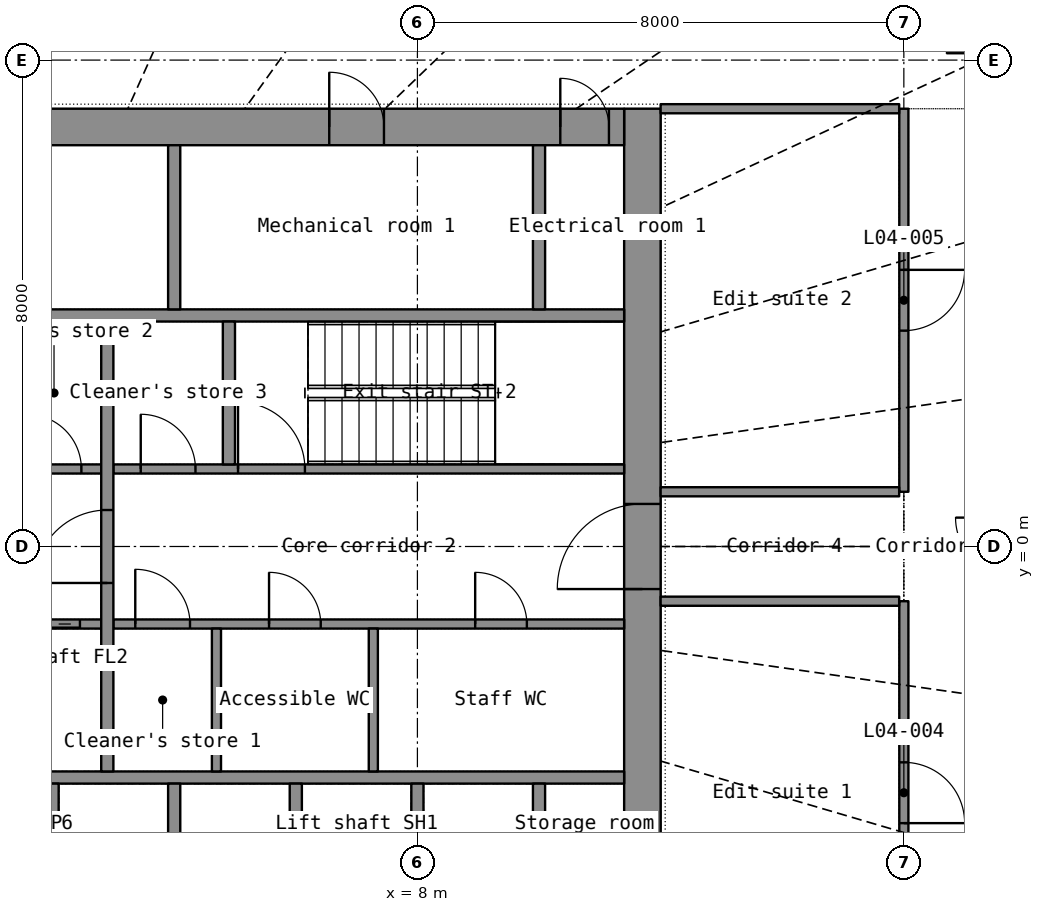
"""IFC4 building model, lengths in metres.
Left out: names, types, materials, properties, quantities, classifications, styles, units other than length and angle.
Written with IfcOpenShell. Run it as: python <this file> out.ifc"""

import sys

from ifc_helpers import new_model, si_unit, direction, frame, frame_2d, origin, place, context, subcontext, project, spatial, rectangle, extrude, element, fill, save


model = new_model("IFC4")
c1 = context("Model", 3, precision=1e-05, world=origin(), true_north=direction((0.0, 1.0)))
c2 = subcontext(c1, "Body", "Model", "MODEL_VIEW")
j1 = project(units=[si_unit("LENGTHUNIT", "METRE"), si_unit("PLANEANGLEUNIT", "RADIAN")], contexts=[c1])
p1 = place(None, origin())
s1 = spatial("IfcSite", under=j1, at=p1, CompositionType="ELEMENT")
p2 = place(p1, origin())
s2 = spatial("IfcBuilding", under=s1, at=p2, CompositionType="ELEMENT")
p3 = place(p2, frame((0.0, 0.0, 24.5)))
s3 = spatial("IfcBuildingStorey", under=s2, at=p3, CompositionType="ELEMENT", Elevation=24.5)
p4 = place(p3, frame((11.7, -7.2, 0.0), z_axis=(0.0, 0.0, 1.0), x_axis=(0.0, 1.0, 0.0)))
e1 = element("IfcWall", 1, at=p4, inside=s3, PredefinedType="SHEAR", context=c2, shape_type="SweptSolid", body=[
    extrude(rectangle(XDim=14.4, YDim=0.6, at=frame_2d((7.2, 0.0))), origin(), (0.0, 0.0, 1.0), 3.8),
])
p5 = place(p4, frame((6.5, 0.0, 0.0)))
e2 = element("IfcOpeningElement", 2, at=p5, cuts=e1, PredefinedType="OPENING", context=c2, shape_type="SweptSolid", body=[
    extrude(rectangle(XDim=1.4, YDim=2.2, at=frame_2d((0.7, 1.1))), frame((0.0, 0.31, 0.0), z_axis=(0.0, -1.0, 0.0), x_axis=(1.0, 0.0, 0.0)), (0.0, 0.0, 1.0), 0.62),
])
p6 = place(p3, frame((-11.4, 6.9, 0.0), z_axis=(0.0, 0.0, 1.0), x_axis=(1.0, 0.0, 0.0)))
e3 = element("IfcWall", 3, at=p6, inside=s3, PredefinedType="SHEAR", context=c2, shape_type="SweptSolid", body=[
    extrude(rectangle(XDim=22.8, YDim=0.6, at=frame_2d((11.4, 0.0))), origin(), (0.0, 0.0, 1.0), 3.8),
])
p7 = place(p6, frame((1.85, 0.0, 0.0)))
e4 = element("IfcOpeningElement", 4, at=p7, cuts=e3, PredefinedType="OPENING", context=c2, shape_type="SweptSolid", body=[
    extrude(rectangle(XDim=1.1, YDim=2.2, at=frame_2d((0.55, 1.1))), frame((0.0, 0.31, 0.0), z_axis=(0.0, -1.0, 0.0), x_axis=(1.0, 0.0, 0.0)), (0.0, 0.0, 1.0), 0.62),
])
p8 = place(p6, frame((9.95, 0.0, 0.0)))
e5 = element("IfcOpeningElement", 5, at=p8, cuts=e3, PredefinedType="OPENING", context=c2, shape_type="SweptSolid", body=[
    extrude(rectangle(XDim=0.9, YDim=2.1, at=frame_2d((0.45, 1.05))), frame((0.0, 0.31, 0.0), z_axis=(0.0, -1.0, 0.0), x_axis=(1.0, 0.0, 0.0)), (0.0, 0.0, 1.0), 0.62),
])
p9 = place(p6, frame((17.95, 0.0, 0.0)))
e6 = element("IfcOpeningElement", 6, at=p9, cuts=e3, PredefinedType="OPENING", context=c2, shape_type="SweptSolid", body=[
    extrude(rectangle(XDim=0.9, YDim=2.1, at=frame_2d((0.45, 1.05))), frame((0.0, 0.31, 0.0), z_axis=(0.0, -1.0, 0.0), x_axis=(1.0, 0.0, 0.0)), (0.0, 0.0, 1.0), 0.62),
])
p10 = place(p6, frame((0.25, 0.0, 0.0)))
e7 = element("IfcOpeningElement", 7, at=p10, cuts=e3, PredefinedType="OPENING", context=c2, shape_type="SweptSolid", body=[
    extrude(rectangle(XDim=0.8, YDim=2.05, at=frame_2d((0.4, 1.025))), frame((0.0, 0.31, 0.0), z_axis=(0.0, -1.0, 0.0), x_axis=(1.0, 0.0, 0.0)), (0.0, 0.0, 1.0), 0.62),
])
p11 = place(p6, frame((21.75, 0.0, 0.0)))
e8 = element("IfcOpeningElement", 8, at=p11, cuts=e3, PredefinedType="OPENING", context=c2, shape_type="SweptSolid", body=[
    extrude(rectangle(XDim=0.8, YDim=2.05, at=frame_2d((0.4, 1.025))), frame((0.0, 0.31, 0.0), z_axis=(0.0, -1.0, 0.0), x_axis=(1.0, 0.0, 0.0)), (0.0, 0.0, 1.0), 0.62),
])
for number, where, z_axis, x_axis in (
    (9, (-11.4, -3.8, 0.0), (0.0, 0.0, 1.0), (1.0, 0.0, 0.0)),
    (10, (-11.4, 3.8, 0.0), (0.0, 0.0, 1.0), (1.0, 0.0, 0.0)),
):
    element("IfcWall", number, at=place(p3, frame(where, z_axis=z_axis, x_axis=x_axis)), inside=s3, PredefinedType="SHEAR", context=c2, shape_type="SweptSolid", body=[
        extrude(rectangle(XDim=22.8, YDim=0.2, at=frame_2d((11.4, 0.0))), origin(), (0.0, 0.0, 1.0), 3.8),
    ])
for number, where, z_axis, x_axis in (
    (11, (2.0, -6.6, 0.0), (0.0, 0.0, 1.0), (0.0, 1.0, 0.0)),
    (12, (4.0, -6.6, 0.0), (0.0, 0.0, 1.0), (0.0, 1.0, 0.0)),
    (13, (6.0, -6.6, 0.0), (0.0, 0.0, 1.0), (0.0, 1.0, 0.0)),
    (14, (8.0, -6.6, 0.0), (0.0, 0.0, 1.0), (0.0, 1.0, 0.0)),
    (15, (10.0, -6.6, 0.0), (0.0, 0.0, 1.0), (0.0, 1.0, 0.0)),
    (16, (10.0, 3.9, 0.0), (0.0, 0.0, 1.0), (0.0, 1.0, 0.0)),
):
    element("IfcWall", number, at=place(p3, frame(where, z_axis=z_axis, x_axis=x_axis)), inside=s3, PredefinedType="SHEAR", context=c2, shape_type="SweptSolid", body=[
        extrude(rectangle(XDim=2.7, YDim=0.2, at=frame_2d((1.35, 0.0))), origin(), (0.0, 0.0, 1.0), 3.8),
    ])
p12 = place(p3, frame((4.0, 3.9, 0.0), z_axis=(0.0, 0.0, 1.0), x_axis=(0.0, 1.0, 0.0)))
e17 = element("IfcWall", 17, at=p12, inside=s3, PredefinedType="PARTITIONING", context=c2, shape_type="SweptSolid", body=[
    extrude(rectangle(XDim=2.7, YDim=0.2, at=frame_2d((1.35, 0.0))), origin(), (0.0, 0.0, 1.0), 3.8),
])
p13 = place(p3, frame((-2.8, -1.275, 0.0), z_axis=(0.0, 0.0, 1.0), x_axis=(1.0, 0.0, 0.0)))
e18 = element("IfcWall", 18, at=p13, inside=s3, PredefinedType="SHEAR", context=c2, shape_type="SweptSolid", body=[
    extrude(rectangle(XDim=5.6, YDim=0.15, at=frame_2d((2.8, 0.0))), origin(), (0.0, 0.0, 1.0), 3.8),
])
p14 = place(p13, frame((4.15, 0.0, 0.0)))
e19 = element("IfcOpeningElement", 19, at=p14, cuts=e18, PredefinedType="OPENING", context=c2, shape_type="SweptSolid", body=[
    extrude(rectangle(XDim=1.1, YDim=2.2, at=frame_2d((0.55, 1.1))), frame((0.0, 0.085, 0.0), z_axis=(0.0, -1.0, 0.0), x_axis=(1.0, 0.0, 0.0)), (0.0, 0.0, 1.0), 0.17),
])
p15 = place(p13, frame((0.326, 0.0, 0.0)))
e20 = element("IfcOpeningElement", 20, at=p15, cuts=e18, PredefinedType="OPENING", context=c2, shape_type="SweptSolid", body=[
    extrude(rectangle(XDim=0.9, YDim=2.1, at=frame_2d((0.45, 1.05))), frame((0.0, 0.085, 0.0), z_axis=(0.0, -1.0, 0.0), x_axis=(1.0, 0.0, 0.0)), (0.0, 0.0, 1.0), 0.17),
])
p16 = place(p13, frame((2.201, 0.0, 0.0)))
e21 = element("IfcOpeningElement", 21, at=p16, cuts=e18, PredefinedType="OPENING", context=c2, shape_type="SweptSolid", body=[
    extrude(rectangle(XDim=0.9, YDim=2.1, at=frame_2d((0.45, 1.05))), frame((0.0, 0.085, 0.0), z_axis=(0.0, -1.0, 0.0), x_axis=(1.0, 0.0, 0.0)), (0.0, 0.0, 1.0), 0.17),
])
p17 = place(p3, frame((3.0, -1.275, 0.0), z_axis=(0.0, 0.0, 1.0), x_axis=(1.0, 0.0, 0.0)))
e22 = element("IfcWall", 22, at=p17, inside=s3, PredefinedType="PARTITIONING", context=c2, shape_type="SweptSolid", body=[
    extrude(rectangle(XDim=8.4, YDim=0.15, at=frame_2d((4.2, 0.0))), origin(), (0.0, 0.0, 1.0), 3.8),
])
p18 = place(p17, frame((0.36, 0.0, 0.0)))
e23 = element("IfcOpeningElement", 23, at=p18, cuts=e22, PredefinedType="OPENING", context=c2, shape_type="SweptSolid", body=[
    extrude(rectangle(XDim=0.9, YDim=2.1, at=frame_2d((0.45, 1.05))), frame((0.0, 0.085, 0.0), z_axis=(0.0, -1.0, 0.0), x_axis=(1.0, 0.0, 0.0)), (0.0, 0.0, 1.0), 0.17),
])
p19 = place(p17, frame((2.56, 0.0, 0.0)))
e24 = element("IfcOpeningElement", 24, at=p19, cuts=e22, PredefinedType="OPENING", context=c2, shape_type="SweptSolid", body=[
    extrude(rectangle(XDim=0.85, YDim=2.1, at=frame_2d((0.425, 1.05))), frame((0.0, 0.085, 0.0), z_axis=(0.0, -1.0, 0.0), x_axis=(1.0, 0.0, 0.0)), (0.0, 0.0, 1.0), 0.17),
])
p20 = place(p17, frame((5.95, 0.0, 0.0)))
e25 = element("IfcOpeningElement", 25, at=p20, cuts=e22, PredefinedType="OPENING", context=c2, shape_type="SweptSolid", body=[
    extrude(rectangle(XDim=0.85, YDim=2.1, at=frame_2d((0.425, 1.05))), frame((0.0, 0.085, 0.0), z_axis=(0.0, -1.0, 0.0), x_axis=(1.0, 0.0, 0.0)), (0.0, 0.0, 1.0), 0.17),
])
p21 = place(p3, frame((-2.8, 1.275, 0.0), z_axis=(0.0, 0.0, 1.0), x_axis=(1.0, 0.0, 0.0)))
e26 = element("IfcWall", 26, at=p21, inside=s3, PredefinedType="SHEAR", context=c2, shape_type="SweptSolid", body=[
    extrude(rectangle(XDim=5.6, YDim=0.15, at=frame_2d((2.8, 0.0))), origin(), (0.0, 0.0, 1.0), 3.8),
])
p22 = place(p21, frame((0.35, 0.0, 0.0)))
e27 = element("IfcOpeningElement", 27, at=p22, cuts=e26, PredefinedType="OPENING", context=c2, shape_type="SweptSolid", body=[
    extrude(rectangle(XDim=1.1, YDim=2.2, at=frame_2d((0.55, 1.1))), frame((0.0, 0.085, 0.0), z_axis=(0.0, -1.0, 0.0), x_axis=(1.0, 0.0, 0.0)), (0.0, 0.0, 1.0), 0.17),
])
p23 = place(p21, frame((2.499, 0.0, 0.0)))
e28 = element("IfcOpeningElement", 28, at=p23, cuts=e26, PredefinedType="OPENING", context=c2, shape_type="SweptSolid", body=[
    extrude(rectangle(XDim=0.9, YDim=2.1, at=frame_2d((0.45, 1.05))), frame((0.0, 0.085, 0.0), z_axis=(0.0, -1.0, 0.0), x_axis=(1.0, 0.0, 0.0)), (0.0, 0.0, 1.0), 0.17),
])
p24 = place(p21, frame((4.374, 0.0, 0.0)))
e29 = element("IfcOpeningElement", 29, at=p24, cuts=e26, PredefinedType="OPENING", context=c2, shape_type="SweptSolid", body=[
    extrude(rectangle(XDim=0.9, YDim=2.1, at=frame_2d((0.45, 1.05))), frame((0.0, 0.085, 0.0), z_axis=(0.0, -1.0, 0.0), x_axis=(1.0, 0.0, 0.0)), (0.0, 0.0, 1.0), 0.17),
])
p25 = place(p3, frame((3.0, 1.275, 0.0), z_axis=(0.0, 0.0, 1.0), x_axis=(1.0, 0.0, 0.0)))
e30 = element("IfcWall", 30, at=p25, inside=s3, PredefinedType="SHEAR", context=c2, shape_type="SweptSolid", body=[
    extrude(rectangle(XDim=8.4, YDim=0.15, at=frame_2d((4.2, 0.0))), origin(), (0.0, 0.0, 1.0), 3.8),
])
p26 = place(p25, frame((2.05, 0.0, 0.0)))
e31 = element("IfcOpeningElement", 31, at=p26, cuts=e30, PredefinedType="OPENING", context=c2, shape_type="SweptSolid", body=[
    extrude(rectangle(XDim=1.1, YDim=2.15, at=frame_2d((0.55, 1.075))), frame((0.0, 0.085, 0.0), z_axis=(0.0, -1.0, 0.0), x_axis=(1.0, 0.0, 0.0)), (0.0, 0.0, 1.0), 0.17),
])
p27 = place(p25, frame((0.45, 0.0, 0.0)))
e32 = element("IfcOpeningElement", 32, at=p27, cuts=e30, PredefinedType="OPENING", context=c2, shape_type="SweptSolid", body=[
    extrude(rectangle(XDim=0.9, YDim=2.1, at=frame_2d((0.45, 1.05))), frame((0.0, 0.085, 0.0), z_axis=(0.0, -1.0, 0.0), x_axis=(1.0, 0.0, 0.0)), (0.0, 0.0, 1.0), 0.17),
])
p28 = place(p3, frame((2.9, -3.7, 0.0), z_axis=(0.0, 0.0, 1.0), x_axis=(0.0, 1.0, 0.0)))
e33 = element("IfcWall", 33, at=p28, inside=s3, PredefinedType="SHEAR", context=c2, shape_type="SweptSolid", body=[
    extrude(rectangle(XDim=7.4, YDim=0.2, at=frame_2d((3.7, 0.0))), origin(), (0.0, 0.0, 1.0), 3.8),
])
p29 = place(p28, frame((3.1, 0.0, 0.0)))
e34 = element("IfcOpeningElement", 34, at=p29, cuts=e33, PredefinedType="OPENING", context=c2, shape_type="SweptSolid", body=[
    extrude(rectangle(XDim=1.2, YDim=2.2, at=frame_2d((0.6, 1.1))), frame((0.0, 0.11, 0.0), z_axis=(0.0, -1.0, 0.0), x_axis=(1.0, 0.0, 0.0)), (0.0, 0.0, 1.0), 0.22),
])
p30 = place(p3, frame((4.9, 1.35, 0.0), z_axis=(0.0, 0.0, 1.0), x_axis=(0.0, 1.0, 0.0)))
e35 = element("IfcWall", 35, at=p30, inside=s3, PredefinedType="SHEAR", context=c2, shape_type="SweptSolid", body=[
    extrude(rectangle(XDim=2.35, YDim=0.2, at=frame_2d((1.175, 0.0))), origin(), (0.0, 0.0, 1.0), 3.8),
])
for number, where, z_axis, x_axis in (
    (36, (4.695, -3.7, 0.0), (0.0, 0.0, 1.0), (0.0, 1.0, 0.0)),
    (37, (7.275, -3.7, 0.0), (0.0, 0.0, 1.0), (0.0, 1.0, 0.0)),
):
    element("IfcWall", number, at=place(p3, frame(where, z_axis=z_axis, x_axis=x_axis)), inside=s3, PredefinedType="PARTITIONING", context=c2, shape_type="SweptSolid", body=[
        extrude(rectangle(XDim=2.35, YDim=0.15, at=frame_2d((1.175, 0.0))), origin(), (0.0, 0.0, 1.0), 3.8),
    ])
p31 = place(p3, frame((16.0, -0.9, 0.0), z_axis=(0.0, 0.0, 1.0), x_axis=(0.0, -1.0, 0.0)))
e38 = element("IfcWall", 38, at=p31, inside=s3, PredefinedType="PARTITIONING", context=c2, shape_type="SweptSolid", body=[
    extrude(rectangle(XDim=6.3, YDim=0.15, at=frame_2d((3.15, 0.0))), origin(), (0.0, 0.0, 1.0), 2.8),
])
p32 = place(p31, frame((2.65, 0.0, 0.0)))
e39 = element("IfcOpeningElement", 39, at=p32, cuts=e38, PredefinedType="OPENING", context=c2, shape_type="SweptSolid", body=[
    extrude(rectangle(XDim=1.0, YDim=2.2, at=frame_2d((0.5, 1.1))), frame((0.0, 0.085, 0.0), z_axis=(0.0, -1.0, 0.0), x_axis=(1.0, 0.0, 0.0)), (0.0, 0.0, 1.0), 0.17),
])
p33 = place(p3, frame((16.0, 7.2, 0.0), z_axis=(0.0, 0.0, 1.0), x_axis=(0.0, -1.0, 0.0)))
e40 = element("IfcWall", 40, at=p33, inside=s3, PredefinedType="PARTITIONING", context=c2, shape_type="SweptSolid", body=[
    extrude(rectangle(XDim=6.3, YDim=0.15, at=frame_2d((3.15, 0.0))), origin(), (0.0, 0.0, 1.0), 2.8),
])
p34 = place(p33, frame((2.65, 0.0, 0.0)))
e41 = element("IfcOpeningElement", 41, at=p34, cuts=e40, PredefinedType="OPENING", context=c2, shape_type="SweptSolid", body=[
    extrude(rectangle(XDim=1.0, YDim=2.2, at=frame_2d((0.5, 1.1))), frame((0.0, 0.085, 0.0), z_axis=(0.0, -1.0, 0.0), x_axis=(1.0, 0.0, 0.0)), (0.0, 0.0, 1.0), 0.17),
])
for number, where, z_axis, x_axis in (
    (42, (12.0, -0.9, 0.0), (0.0, 0.0, 1.0), (1.0, 0.0, 0.0)),
    (43, (12.0, 7.2, 0.0), (0.0, 0.0, 1.0), (1.0, 0.0, 0.0)),
    (44, (15.923, 0.9, 0.0), (0.0, 0.0, 1.0), (-1.0, 0.0, 0.0)),
):
    element("IfcWall", number, at=place(p3, frame(where, z_axis=z_axis, x_axis=x_axis)), inside=s3, PredefinedType="PARTITIONING", context=c2, shape_type="SweptSolid", body=[
        extrude(rectangle(XDim=3.923, YDim=0.15, at=frame_2d((1.961, 0.0))), origin(), (0.0, 0.0, 1.0), 2.8),
    ])
p35 = place(p9, origin())
e45 = element("IfcDoor", 45, at=p35, inside=s3, OperationType="SINGLE_SWING_LEFT", PredefinedType="DOOR", context=c2, shape_type="SweptSolid", body=[
    extrude(rectangle(XDim=0.9, YDim=2.1, at=frame_2d((0.45, 1.05))), frame((0.0, 0.025, 0.0), z_axis=(0.0, -1.0, 0.0), x_axis=(1.0, 0.0, 0.0)), (0.0, 0.0, 1.0), 0.05),
])
fill(e6, e45)
p36 = place(p11, origin())
e46 = element("IfcDoor", 46, at=p36, inside=s3, OperationType="SINGLE_SWING_LEFT", PredefinedType="DOOR", context=c2, shape_type="SweptSolid", body=[
    extrude(rectangle(XDim=0.8, YDim=2.05, at=frame_2d((0.4, 1.025))), frame((0.0, 0.025, 0.0), z_axis=(0.0, -1.0, 0.0), x_axis=(1.0, 0.0, 0.0)), (0.0, 0.0, 1.0), 0.05),
])
fill(e8, e46)
p37 = place(p5, origin())
e47 = element("IfcDoor", 47, at=p37, inside=s3, OperationType="DOUBLE_DOOR_SINGLE_SWING", PredefinedType="DOOR", context=c2, shape_type="SweptSolid", body=[
    extrude(rectangle(XDim=1.4, YDim=2.2, at=frame_2d((0.7, 1.1))), frame((0.0, 0.025, 0.0), z_axis=(0.0, -1.0, 0.0), x_axis=(1.0, 0.0, 0.0)), (0.0, 0.0, 1.0), 0.05),
])
fill(e2, e47)
p38 = place(p29, origin())
e48 = element("IfcDoor", 48, at=p38, inside=s3, OperationType="SINGLE_SWING_LEFT", PredefinedType="DOOR", context=c2, shape_type="SweptSolid", body=[
    extrude(rectangle(XDim=1.2, YDim=2.2, at=frame_2d((0.6, 1.1))), frame((0.0, 0.025, 0.0), z_axis=(0.0, -1.0, 0.0), x_axis=(1.0, 0.0, 0.0)), (0.0, 0.0, 1.0), 0.05),
])
fill(e34, e48)
p39 = place(p14, origin())
e49 = element("IfcDoor", 49, at=p39, inside=s3, OperationType="DOUBLE_DOOR_SLIDING", PredefinedType="DOOR", context=c2, shape_type="SweptSolid", body=[
    extrude(rectangle(XDim=1.1, YDim=2.2, at=frame_2d((0.55, 1.1))), frame((0.0, 0.025, 0.0), z_axis=(0.0, -1.0, 0.0), x_axis=(1.0, 0.0, 0.0)), (0.0, 0.0, 1.0), 0.05),
])
fill(e19, e49)
p40 = place(p26, origin())
e50 = element("IfcDoor", 50, at=p40, inside=s3, OperationType="SINGLE_SWING_LEFT", PredefinedType="DOOR", context=c2, shape_type="SweptSolid", body=[
    extrude(rectangle(XDim=1.1, YDim=2.15, at=frame_2d((0.55, 1.075))), frame((0.0, 0.025, 0.0), z_axis=(0.0, -1.0, 0.0), x_axis=(1.0, 0.0, 0.0)), (0.0, 0.0, 1.0), 0.05),
])
fill(e31, e50)
p41 = place(p18, origin())
e51 = element("IfcDoor", 51, at=p41, inside=s3, OperationType="SINGLE_SWING_LEFT", PredefinedType="DOOR", context=c2, shape_type="SweptSolid", body=[
    extrude(rectangle(XDim=0.9, YDim=2.1, at=frame_2d((0.45, 1.05))), frame((0.0, 0.025, 0.0), z_axis=(0.0, -1.0, 0.0), x_axis=(1.0, 0.0, 0.0)), (0.0, 0.0, 1.0), 0.05),
])
fill(e23, e51)
p42 = place(p19, origin())
e52 = element("IfcDoor", 52, at=p42, inside=s3, OperationType="SINGLE_SWING_LEFT", PredefinedType="DOOR", context=c2, shape_type="SweptSolid", body=[
    extrude(rectangle(XDim=0.85, YDim=2.1, at=frame_2d((0.425, 1.05))), frame((0.0, 0.025, 0.0), z_axis=(0.0, -1.0, 0.0), x_axis=(1.0, 0.0, 0.0)), (0.0, 0.0, 1.0), 0.05),
])
fill(e24, e52)
p43 = place(p20, origin())
e53 = element("IfcDoor", 53, at=p43, inside=s3, OperationType="SINGLE_SWING_LEFT", PredefinedType="DOOR", context=c2, shape_type="SweptSolid", body=[
    extrude(rectangle(XDim=0.85, YDim=2.1, at=frame_2d((0.425, 1.05))), frame((0.0, 0.025, 0.0), z_axis=(0.0, -1.0, 0.0), x_axis=(1.0, 0.0, 0.0)), (0.0, 0.0, 1.0), 0.05),
])
fill(e25, e53)
p44 = place(p24, origin())
e54 = element("IfcDoor", 54, at=p44, inside=s3, OperationType="SINGLE_SWING_LEFT", PredefinedType="DOOR", context=c2, shape_type="SweptSolid", body=[
    extrude(rectangle(XDim=0.9, YDim=2.1, at=frame_2d((0.45, 1.05))), frame((0.0, 0.025, 0.0), z_axis=(0.0, -1.0, 0.0), x_axis=(1.0, 0.0, 0.0)), (0.0, 0.0, 1.0), 0.05),
])
fill(e29, e54)
p45 = place(p27, origin())
e55 = element("IfcDoor", 55, at=p45, inside=s3, OperationType="SINGLE_SWING_LEFT", PredefinedType="DOOR", context=c2, shape_type="SweptSolid", body=[
    extrude(rectangle(XDim=0.9, YDim=2.1, at=frame_2d((0.45, 1.05))), frame((0.0, 0.025, 0.0), z_axis=(0.0, -1.0, 0.0), x_axis=(1.0, 0.0, 0.0)), (0.0, 0.0, 1.0), 0.05),
])
fill(e32, e55)
p46 = place(p32, origin())
e56 = element("IfcDoor", 56, at=p46, inside=s3, OperationType="SINGLE_SWING_RIGHT", PredefinedType="DOOR", context=c2, shape_type="SweptSolid", body=[
    extrude(rectangle(XDim=1.0, YDim=2.2, at=frame_2d((0.5, 1.1))), frame((0.0, 0.025, 0.0), z_axis=(0.0, -1.0, 0.0), x_axis=(1.0, 0.0, 0.0)), (0.0, 0.0, 1.0), 0.05),
])
fill(e39, e56)
p47 = place(p34, origin())
e57 = element("IfcDoor", 57, at=p47, inside=s3, OperationType="SINGLE_SWING_LEFT", PredefinedType="DOOR", context=c2, shape_type="SweptSolid", body=[
    extrude(rectangle(XDim=1.0, YDim=2.2, at=frame_2d((0.5, 1.1))), frame((0.0, 0.025, 0.0), z_axis=(0.0, -1.0, 0.0), x_axis=(1.0, 0.0, 0.0)), (0.0, 0.0, 1.0), 0.05),
])
fill(e41, e57)
save(model, sys.argv[1])
